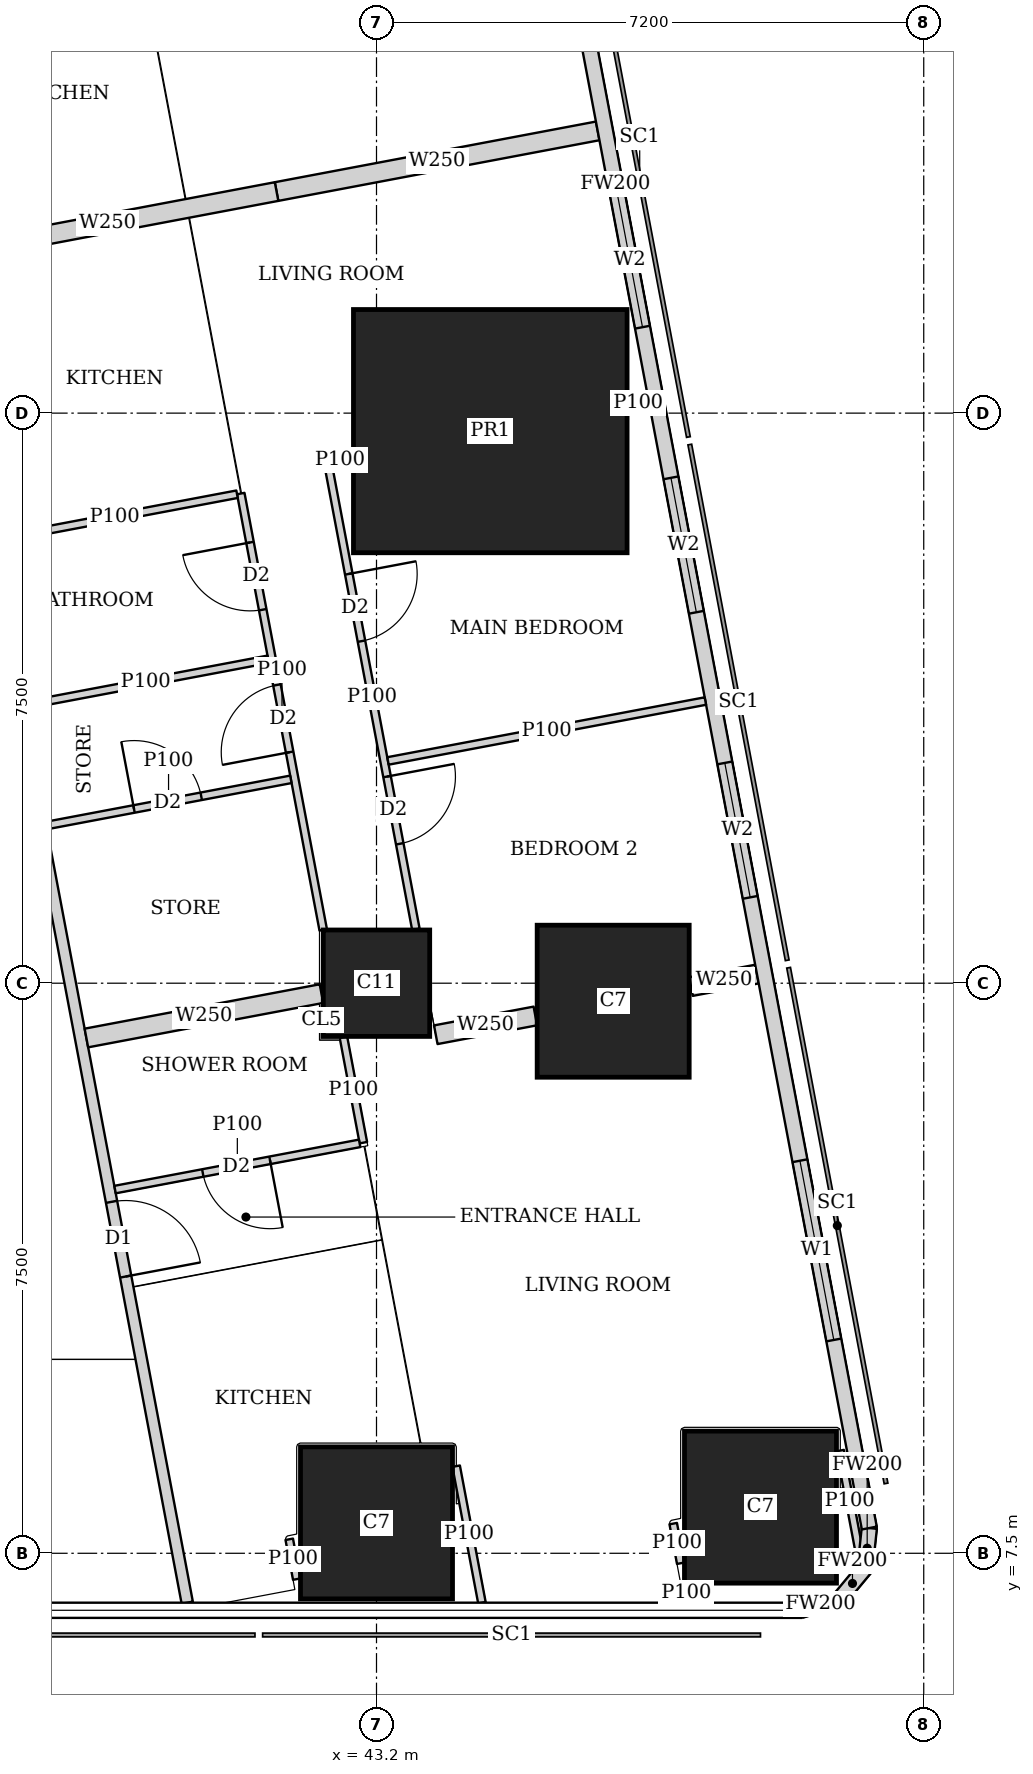
"""IFC4 building model, lengths in metres.
Left out: names, types, materials, properties, quantities, classifications, styles, units other than length and angle.
Written with IfcOpenShell. Run it as: python <this file> out.ifc"""

import sys

from ifc_helpers import new_model, si_unit, direction, frame, frame_2d, origin, origin_2d, place, context, subcontext, project, spatial, rectangle, extrude, element, fill, save


model = new_model("IFC4")
c1 = context("Model", 3, precision=1e-05, world=origin(), true_north=direction((0.0, 1.0)))
c2 = subcontext(c1, "Body", "Model", "MODEL_VIEW")
j1 = project(units=[si_unit("LENGTHUNIT", "METRE"), si_unit("PLANEANGLEUNIT", "RADIAN")], contexts=[c1])
p1 = place(None, origin())
s1 = spatial("IfcSite", under=j1, at=p1, CompositionType="ELEMENT")
p2 = place(p1, origin())
s2 = spatial("IfcBuilding", under=s1, at=p2, CompositionType="ELEMENT")
p3 = place(p2, frame((0.0, 0.0, 266.6)))
s3 = spatial("IfcBuildingStorey", under=s2, at=p3, CompositionType="ELEMENT", Elevation=266.6)
for number, where, z_axis, x_axis in (
    (1, (43.2, 7.9, 0.0), (0.0, 0.0, 1.0), (1.0, 0.0, 0.0)),
    (2, (48.252, 8.107, 0.0), (0.0, 0.0, 1.0), (1.0, 0.0, 0.0)),
):
    element("IfcColumn", number, at=place(p3, frame(where, z_axis=z_axis, x_axis=x_axis)), inside=s3, PredefinedType="COLUMN", context=c2, shape_type="SweptSolid", body=[
        extrude(rectangle(XDim=2.0, YDim=2.0, at=origin_2d()), origin(), (0.0, 0.0, 1.0), 3.75),
    ])
p4 = place(p3, frame((43.2, 15.0, 0.0), z_axis=(0.0, 0.0, 1.0), x_axis=(1.0, 0.0, 0.0)))
e3 = element("IfcColumn", 3, at=p4, inside=s3, PredefinedType="COLUMN", context=c2, shape_type="SweptSolid", body=[
    extrude(rectangle(XDim=1.4, YDim=1.4, at=origin_2d()), origin(), (0.0, 0.0, 1.0), 3.75),
])
p5 = place(p3, frame((46.314, 14.763, 0.0), z_axis=(0.0, 0.0, 1.0), x_axis=(1.0, 0.0, 0.0)))
e4 = element("IfcColumn", 4, at=p5, inside=s3, PredefinedType="COLUMN", context=c2, shape_type="SweptSolid", body=[
    extrude(rectangle(XDim=2.0, YDim=2.0, at=origin_2d()), origin(), (0.0, 0.0, 1.0), 3.75),
])
p6 = place(p3, frame((44.697, 22.263, 0.0), z_axis=(0.0, 0.0, 1.0), x_axis=(1.0, 0.0, 0.0)))
e5 = element("IfcColumn", 5, at=p6, inside=s3, PredefinedType="COLUMN", context=c2, shape_type="SweptSolid", body=[
    extrude(rectangle(XDim=3.6, YDim=3.2, at=origin_2d()), origin(), (0.0, 0.0, 1.0), 3.75),
])
p7 = place(p3, frame((48.787, 6.75, 0.0), z_axis=(0.0, 0.0, 1.0), x_axis=(0.957282247819, 0.289155145225, 0.0)))
e6 = element("IfcWall", 6, at=p7, inside=s3, PredefinedType="SOLIDWALL", context=c2, shape_type="SweptSolid", body=[
    extrude(rectangle(XDim=0.533, YDim=0.2, at=frame_2d((0.266, 0.0))), origin(), (0.0, 0.0, 1.0), 3.5),
])
p8 = place(p3, frame((49.297, 6.904, 0.0), z_axis=(0.0, 0.0, 1.0), x_axis=(0.639255849474, 0.768994121508, 0.0)))
e7 = element("IfcWall", 7, at=p8, inside=s3, PredefinedType="SOLIDWALL", context=c2, shape_type="SweptSolid", body=[
    extrude(rectangle(XDim=0.518, YDim=0.2, at=frame_2d((0.259, 0.0))), origin(), (0.0, 0.0, 1.0), 3.5),
])
p9 = place(p3, frame((49.628, 7.302, 0.0), z_axis=(0.0, 0.0, 1.0), x_axis=(0.105352390132, 0.994434952068, 0.0)))
e8 = element("IfcWall", 8, at=p9, inside=s3, PredefinedType="SOLIDWALL", context=c2, shape_type="SweptSolid", body=[
    extrude(rectangle(XDim=0.533, YDim=0.2, at=frame_2d((0.267, 0.0))), origin(), (0.0, 0.0, 1.0), 3.5),
])
p10 = place(p3, frame((49.684, 7.832, 0.0), z_axis=(0.0, 0.0, 1.0), x_axis=(-0.185616669694, 0.982622232565, 0.0)))
e9 = element("IfcWall", 9, at=p10, inside=s3, PredefinedType="SOLIDWALL", context=c2, shape_type="SweptSolid", body=[
    extrude(rectangle(XDim=36.0, YDim=0.2, at=frame_2d((18.0, 0.0))), origin(), (0.0, 0.0, 1.0), 3.5),
])
p11 = place(p10, frame((2.518, 0.0, 0.9)))
e10 = element("IfcOpeningElement", 10, at=p11, cuts=e9, PredefinedType="OPENING", context=c2, shape_type="SweptSolid", body=[
    extrude(rectangle(XDim=2.4, YDim=1.5, at=frame_2d((1.2, 0.75))), frame((0.0, 0.11, 0.0), z_axis=(0.0, -1.0, 0.0), x_axis=(1.0, 0.0, 0.0)), (0.0, 0.0, 1.0), 0.22),
])
p12 = place(p10, frame((8.444, 0.0, 0.9)))
e11 = element("IfcOpeningElement", 11, at=p12, cuts=e9, PredefinedType="OPENING", context=c2, shape_type="SweptSolid", body=[
    extrude(rectangle(XDim=1.8, YDim=1.5, at=frame_2d((0.9, 0.75))), frame((0.0, 0.11, 0.0), z_axis=(0.0, -1.0, 0.0), x_axis=(1.0, 0.0, 0.0)), (0.0, 0.0, 1.0), 0.22),
])
p13 = place(p10, frame((12.261, 0.0, 0.9)))
e12 = element("IfcOpeningElement", 12, at=p13, cuts=e9, PredefinedType="OPENING", context=c2, shape_type="SweptSolid", body=[
    extrude(rectangle(XDim=1.8, YDim=1.5, at=frame_2d((0.9, 0.75))), frame((0.0, 0.11, 0.0), z_axis=(0.0, -1.0, 0.0), x_axis=(1.0, 0.0, 0.0)), (0.0, 0.0, 1.0), 0.22),
])
p14 = place(p10, frame((16.078, 0.0, 0.9)))
e13 = element("IfcOpeningElement", 13, at=p14, cuts=e9, PredefinedType="OPENING", context=c2, shape_type="SweptSolid", body=[
    extrude(rectangle(XDim=1.8, YDim=1.5, at=frame_2d((0.9, 0.75))), frame((0.0, 0.11, 0.0), z_axis=(0.0, -1.0, 0.0), x_axis=(1.0, 0.0, 0.0)), (0.0, 0.0, 1.0), 0.22),
])
p15 = place(p10, frame((19.894, 0.0, 0.9)))
e14 = element("IfcOpeningElement", 14, at=p15, cuts=e9, PredefinedType="OPENING", context=c2, shape_type="SweptSolid", body=[
    extrude(rectangle(XDim=1.8, YDim=1.5, at=frame_2d((0.9, 0.75))), frame((0.0, 0.11, 0.0), z_axis=(0.0, -1.0, 0.0), x_axis=(1.0, 0.0, 0.0)), (0.0, 0.0, 1.0), 0.22),
])
p16 = place(p10, frame((23.71, 0.0, 0.9)))
e15 = element("IfcOpeningElement", 15, at=p16, cuts=e9, PredefinedType="OPENING", context=c2, shape_type="SweptSolid", body=[
    extrude(rectangle(XDim=1.8, YDim=1.5, at=frame_2d((0.9, 0.75))), frame((0.0, 0.11, 0.0), z_axis=(0.0, -1.0, 0.0), x_axis=(1.0, 0.0, 0.0)), (0.0, 0.0, 1.0), 0.22),
])
p17 = place(p10, frame((27.526, 0.0, 0.9)))
e16 = element("IfcOpeningElement", 16, at=p17, cuts=e9, PredefinedType="OPENING", context=c2, shape_type="SweptSolid", body=[
    extrude(rectangle(XDim=1.8, YDim=1.5, at=frame_2d((0.9, 0.75))), frame((0.0, 0.11, 0.0), z_axis=(0.0, -1.0, 0.0), x_axis=(1.0, 0.0, 0.0)), (0.0, 0.0, 1.0), 0.22),
])
p18 = place(p10, frame((32.046, 0.0, 0.9)))
e17 = element("IfcOpeningElement", 17, at=p18, cuts=e9, PredefinedType="OPENING", context=c2, shape_type="SweptSolid", body=[
    extrude(rectangle(XDim=1.8, YDim=1.5, at=frame_2d((0.9, 0.75))), frame((0.0, 0.11, 0.0), z_axis=(0.0, -1.0, 0.0), x_axis=(1.0, 0.0, 0.0)), (0.0, 0.0, 1.0), 0.22),
])
p19 = place(p3, frame((34.036, 42.186, 0.0), z_axis=(0.0, 0.0, 1.0), x_axis=(0.185593518645, -0.9826266055, 0.0)))
e18 = element("IfcWall", 18, at=p19, inside=s3, PredefinedType="SOLIDWALL", context=c2, shape_type="SweptSolid", body=[
    extrude(rectangle(XDim=35.961, YDim=0.15, at=frame_2d((17.98, 0.0))), origin(), (0.0, 0.0, 1.0), 2.5),
])
p20 = place(p19, frame((15.529, 0.0, 0.0)))
e19 = element("IfcOpeningElement", 19, at=p20, cuts=e18, PredefinedType="OPENING", context=c2, shape_type="SweptSolid", body=[
    extrude(rectangle(XDim=1.0, YDim=2.1, at=frame_2d((0.5, 1.05))), frame((0.0, 0.085, 0.0), z_axis=(0.0, -1.0, 0.0), x_axis=(1.0, 0.0, 0.0)), (0.0, 0.0, 1.0), 0.17),
])
p21 = place(p19, frame((19.345, 0.0, 0.0)))
e20 = element("IfcOpeningElement", 20, at=p21, cuts=e18, PredefinedType="OPENING", context=c2, shape_type="SweptSolid", body=[
    extrude(rectangle(XDim=1.0, YDim=2.1, at=frame_2d((0.5, 1.05))), frame((0.0, 0.085, 0.0), z_axis=(0.0, -1.0, 0.0), x_axis=(1.0, 0.0, 0.0)), (0.0, 0.0, 1.0), 0.17),
])
p22 = place(p19, frame((30.594, 0.0, 0.0)))
e21 = element("IfcOpeningElement", 21, at=p22, cuts=e18, PredefinedType="OPENING", context=c2, shape_type="SweptSolid", body=[
    extrude(rectangle(XDim=1.0, YDim=2.1, at=frame_2d((0.5, 1.05))), frame((0.0, 0.085, 0.0), z_axis=(0.0, -1.0, 0.0), x_axis=(1.0, 0.0, 0.0)), (0.0, 0.0, 1.0), 0.17),
])
p23 = place(p3, frame((44.248, 8.646, 0.0), z_axis=(0.0, 0.0, 1.0), x_axis=(0.185417594585, -0.982659816833, 0.0)))
e22 = element("IfcWall", 22, at=p23, inside=s3, PredefinedType="PARTITIONING", context=c2, shape_type="SweptSolid", body=[
    extrude(rectangle(XDim=1.828, YDim=0.1, at=frame_2d((0.914, 0.0))), origin(), (0.0, 0.0, 1.0), 2.05),
])
p24 = place(p3, frame((42.151, 7.16, 0.0), z_axis=(0.0, 0.0, 1.0), x_axis=(-0.185366164644, 0.982669519729, 0.0)))
e23 = element("IfcWall", 23, at=p24, inside=s3, PredefinedType="PARTITIONING", context=c2, shape_type="SweptSolid", body=[
    extrude(rectangle(XDim=0.533, YDim=0.1, at=frame_2d((0.267, 0.0))), origin(), (0.0, 0.0, 1.0), 2.5),
])
p25 = place(p3, frame((49.3, 8.851, 0.0), z_axis=(0.0, 0.0, 1.0), x_axis=(0.18581620423, -0.982584519645, 0.0)))
e24 = element("IfcWall", 24, at=p25, inside=s3, PredefinedType="PARTITIONING", context=c2, shape_type="SweptSolid", body=[
    extrude(rectangle(XDim=1.351, YDim=0.1, at=frame_2d((0.675, 0.0))), origin(), (0.0, 0.0, 1.0), 3.5),
])
p26 = place(p3, frame((47.301, 6.85, 0.0), z_axis=(0.0, 0.0, 1.0), x_axis=(-0.187513903188, 0.982261948826, 0.0)))
e25 = element("IfcWall", 25, at=p26, inside=s3, PredefinedType="PARTITIONING", context=c2, shape_type="SweptSolid", body=[
    extrude(rectangle(XDim=0.251, YDim=0.1, at=frame_2d((0.125, 0.0))), origin(), (0.0, 0.0, 1.0), 3.5),
])
p27 = place(p3, frame((47.203, 7.369, 0.0), z_axis=(0.0, 0.0, 1.0), x_axis=(-0.186456243114, 0.982463266185, 0.0)))
e26 = element("IfcWall", 26, at=p27, inside=s3, PredefinedType="PARTITIONING", context=c2, shape_type="SweptSolid", body=[
    extrude(rectangle(XDim=0.53, YDim=0.1, at=frame_2d((0.265, 0.0))), origin(), (0.0, 0.0, 1.0), 2.05),
])
p28 = place(p3, frame((42.566, 21.809, 0.0), z_axis=(0.0, 0.0, 1.0), x_axis=(0.185613526435, -0.98262282632, 0.0)))
e27 = element("IfcWall", 27, at=p28, inside=s3, PredefinedType="PARTITIONING", context=c2, shape_type="SweptSolid", body=[
    extrude(rectangle(XDim=6.207, YDim=0.1, at=frame_2d((3.104, 0.0))), origin(), (0.0, 0.0, 1.0), 2.5),
])
p29 = place(p28, frame((1.45, 0.0, 0.0)))
e28 = element("IfcOpeningElement", 28, at=p29, cuts=e27, PredefinedType="OPENING", context=c2, shape_type="SweptSolid", body=[
    extrude(rectangle(XDim=0.9, YDim=2.1, at=frame_2d((0.45, 1.05))), frame((0.0, 0.06, 0.0), z_axis=(0.0, -1.0, 0.0), x_axis=(1.0, 0.0, 0.0)), (0.0, 0.0, 1.0), 0.12),
])
p30 = place(p28, frame((4.163, 0.0, 0.0)))
e29 = element("IfcOpeningElement", 29, at=p30, cuts=e27, PredefinedType="OPENING", context=c2, shape_type="SweptSolid", body=[
    extrude(rectangle(XDim=0.9, YDim=2.1, at=frame_2d((0.45, 1.05))), frame((0.0, 0.06, 0.0), z_axis=(0.0, -1.0, 0.0), x_axis=(1.0, 0.0, 0.0)), (0.0, 0.0, 1.0), 0.12),
])
p31 = place(p3, frame((41.414, 21.442, 0.0), z_axis=(0.0, 0.0, 1.0), x_axis=(0.185698675093, -0.982606738257, 0.0)))
e30 = element("IfcWall", 30, at=p31, inside=s3, PredefinedType="PARTITIONING", context=c2, shape_type="SweptSolid", body=[
    extrude(rectangle(XDim=5.843, YDim=0.1, at=frame_2d((2.921, 0.0))), origin(), (0.0, 0.0, 1.0), 3.5),
])
p32 = place(p31, frame((0.655, 0.0, 0.0)))
e31 = element("IfcOpeningElement", 31, at=p32, cuts=e30, PredefinedType="OPENING", context=c2, shape_type="SweptSolid", body=[
    extrude(rectangle(XDim=0.9, YDim=2.1, at=frame_2d((0.45, 1.05))), frame((0.0, 0.06, 0.0), z_axis=(0.0, -1.0, 0.0), x_axis=(1.0, 0.0, 0.0)), (0.0, 0.0, 1.0), 0.12),
])
p33 = place(p31, frame((2.563, 0.0, 0.0)))
e32 = element("IfcOpeningElement", 32, at=p33, cuts=e30, PredefinedType="OPENING", context=c2, shape_type="SweptSolid", body=[
    extrude(rectangle(XDim=0.9, YDim=2.1, at=frame_2d((0.45, 1.05))), frame((0.0, 0.06, 0.0), z_axis=(0.0, -1.0, 0.0), x_axis=(1.0, 0.0, 0.0)), (0.0, 0.0, 1.0), 0.12),
])
p34 = place(p3, frame((46.782, 22.657, 0.0), z_axis=(0.0, 0.0, 1.0), x_axis=(-0.982574553168, -0.185868898601, 0.0)))
e33 = element("IfcWall", 33, at=p34, inside=s3, PredefinedType="PARTITIONING", context=c2, shape_type="SweptSolid", body=[
    extrude(rectangle(XDim=0.28, YDim=0.1, at=frame_2d((0.14, 0.0))), origin(), (0.0, 0.0, 1.0), 3.5),
])
p35 = place(p3, frame((42.887, 21.921, 0.0), z_axis=(0.0, 0.0, 1.0), x_axis=(-0.982274918032, -0.187445953293, 0.0)))
e34 = element("IfcWall", 34, at=p35, inside=s3, PredefinedType="PARTITIONING", context=c2, shape_type="SweptSolid", body=[
    extrude(rectangle(XDim=0.336, YDim=0.1, at=frame_2d((0.168, 0.0))), origin(), (0.0, 0.0, 1.0), 2.5),
])
p36 = place(p3, frame((47.527, 18.712, 0.0), z_axis=(0.0, 0.0, 1.0), x_axis=(-0.982665405803, -0.185387972203, 0.0)))
e35 = element("IfcWall", 35, at=p36, inside=s3, PredefinedType="PARTITIONING", context=c2, shape_type="SweptSolid", body=[
    extrude(rectangle(XDim=4.25, YDim=0.1, at=frame_2d((2.125, 0.0))), origin(), (0.0, 0.0, 1.0), 2.5),
])
p37 = place(p3, frame((41.365, 21.433, 0.0), z_axis=(0.0, 0.0, 1.0), x_axis=(-0.982607026909, -0.185697147715, 0.0)))
e36 = element("IfcWall", 36, at=p37, inside=s3, PredefinedType="PARTITIONING", context=c2, shape_type="SweptSolid", body=[
    extrude(rectangle(XDim=3.275, YDim=0.1, at=frame_2d((1.637, 0.0))), origin(), (0.0, 0.0, 1.0), 3.5),
])
p38 = place(p3, frame((42.073, 17.682, 0.0), z_axis=(0.0, 0.0, 1.0), x_axis=(-0.982620626894, -0.185625169636, 0.0)))
e37 = element("IfcWall", 37, at=p38, inside=s3, PredefinedType="PARTITIONING", context=c2, shape_type="SweptSolid", body=[
    extrude(rectangle(XDim=3.275, YDim=0.1, at=frame_2d((1.637, 0.0))), origin(), (0.0, 0.0, 1.0), 3.5),
])
p39 = place(p38, frame((1.2, 0.0, 0.0)))
e38 = element("IfcOpeningElement", 38, at=p39, cuts=e37, PredefinedType="OPENING", context=c2, shape_type="SweptSolid", body=[
    extrude(rectangle(XDim=0.9, YDim=2.1, at=frame_2d((0.45, 1.05))), frame((0.0, 0.06, 0.0), z_axis=(0.0, -1.0, 0.0), x_axis=(1.0, 0.0, 0.0)), (0.0, 0.0, 1.0), 0.12),
])
p40 = place(p3, frame((41.775, 19.261, 0.0), z_axis=(0.0, 0.0, 1.0), x_axis=(-0.982620626894, -0.185625169636, 0.0)))
e39 = element("IfcWall", 39, at=p40, inside=s3, PredefinedType="PARTITIONING", context=c2, shape_type="SweptSolid", body=[
    extrude(rectangle(XDim=3.275, YDim=0.1, at=frame_2d((1.637, 0.0))), origin(), (0.0, 0.0, 1.0), 3.5),
])
p41 = place(p3, frame((46.11, 26.213, 0.0), z_axis=(0.0, 0.0, 1.0), x_axis=(-0.982633535512, -0.185556823879, 0.0)))
e40 = element("IfcWall", 40, at=p41, inside=s3, PredefinedType="SOLIDWALL", context=c2, shape_type="SweptSolid", body=[
    extrude(rectangle(XDim=4.3, YDim=0.25, at=frame_2d((2.15, 0.0))), origin(), (0.0, 0.0, 1.0), 2.5),
])
p42 = place(p3, frame((41.885, 25.415, 0.0), z_axis=(0.0, 0.0, 1.0), x_axis=(-0.982612837616, -0.185666398014, 0.0)))
e41 = element("IfcWall", 41, at=p42, inside=s3, PredefinedType="SOLIDWALL", context=c2, shape_type="SweptSolid", body=[
    extrude(rectangle(XDim=4.525, YDim=0.25, at=frame_2d((2.262, 0.0))), origin(), (0.0, 0.0, 1.0), 3.5),
])
p43 = place(p3, frame((42.765, 14.29, 0.0), z_axis=(0.0, 0.0, 1.0), x_axis=(0.185634589628, -0.982618847333, 0.0)))
e42 = element("IfcWall", 42, at=p43, inside=s3, PredefinedType="PARTITIONING", context=c2, shape_type="SweptSolid", body=[
    extrude(rectangle(XDim=1.413, YDim=0.1, at=frame_2d((0.706, 0.0))), origin(), (0.0, 0.0, 1.0), 3.5),
])
p44 = place(p3, frame((42.978, 12.893, 0.0), z_axis=(0.0, 0.0, 1.0), x_axis=(-0.982607026909, -0.185697147715, 0.0)))
e43 = element("IfcWall", 43, at=p44, inside=s3, PredefinedType="PARTITIONING", context=c2, shape_type="SweptSolid", body=[
    extrude(rectangle(XDim=3.275, YDim=0.1, at=frame_2d((1.637, 0.0))), origin(), (0.0, 0.0, 1.0), 3.5),
])
p45 = place(p44, frame((1.2, 0.0, 0.0)))
e44 = element("IfcOpeningElement", 44, at=p45, cuts=e43, PredefinedType="OPENING", context=c2, shape_type="SweptSolid", body=[
    extrude(rectangle(XDim=0.9, YDim=2.1, at=frame_2d((0.45, 1.05))), frame((0.0, 0.06, 0.0), z_axis=(0.0, -1.0, 0.0), x_axis=(1.0, 0.0, 0.0)), (0.0, 0.0, 1.0), 0.12),
])
p46 = place(p3, frame((48.206, 15.12, 0.0), z_axis=(0.0, 0.0, 1.0), x_axis=(-0.982608419258, -0.185689780017, 0.0)))
e45 = element("IfcWall", 45, at=p46, inside=s3, PredefinedType="SOLIDWALL", context=c2, shape_type="SweptSolid", body=[
    extrude(rectangle(XDim=0.884, YDim=0.25, at=frame_2d((0.442, 0.0))), origin(), (0.0, 0.0, 1.0), 3.5),
])
p47 = place(p3, frame((45.29, 14.569, 0.0), z_axis=(0.0, 0.0, 1.0), x_axis=(-0.982676759201, -0.185327782391, 0.0)))
e46 = element("IfcWall", 46, at=p47, inside=s3, PredefinedType="SOLIDWALL", context=c2, shape_type="SweptSolid", body=[
    extrude(rectangle(XDim=1.333, YDim=0.25, at=frame_2d((0.667, 0.0))), origin(), (0.0, 0.0, 1.0), 3.5),
])
p48 = place(p3, frame((42.476, 14.863, 0.0), z_axis=(0.0, 0.0, 1.0), x_axis=(-0.982638716117, -0.185529387398, 0.0)))
e47 = element("IfcWall", 47, at=p48, inside=s3, PredefinedType="SOLIDWALL", context=c2, shape_type="SweptSolid", body=[
    extrude(rectangle(XDim=3.148, YDim=0.25, at=frame_2d((1.574, 0.0))), origin(), (0.0, 0.0, 1.0), 3.5),
])
p49 = place(p11, origin())
e48 = element("IfcWindow", 48, at=p49, inside=s3, PartitioningType="SINGLE_PANEL", PredefinedType="WINDOW", context=c2, shape_type="SweptSolid", body=[
    extrude(rectangle(XDim=2.4, YDim=1.5, at=frame_2d((1.2, 0.75))), frame((0.0, 0.03, 0.0), z_axis=(0.0, -1.0, 0.0), x_axis=(1.0, 0.0, 0.0)), (0.0, 0.0, 1.0), 0.06),
])
fill(e10, e48)
p50 = place(p12, origin())
e49 = element("IfcWindow", 49, at=p50, inside=s3, PartitioningType="SINGLE_PANEL", PredefinedType="WINDOW", context=c2, shape_type="SweptSolid", body=[
    extrude(rectangle(XDim=1.8, YDim=1.5, at=frame_2d((0.9, 0.75))), frame((0.0, 0.03, 0.0), z_axis=(0.0, -1.0, 0.0), x_axis=(1.0, 0.0, 0.0)), (0.0, 0.0, 1.0), 0.06),
])
fill(e11, e49)
p51 = place(p13, origin())
e50 = element("IfcWindow", 50, at=p51, inside=s3, PartitioningType="SINGLE_PANEL", PredefinedType="WINDOW", context=c2, shape_type="SweptSolid", body=[
    extrude(rectangle(XDim=1.8, YDim=1.5, at=frame_2d((0.9, 0.75))), frame((0.0, 0.03, 0.0), z_axis=(0.0, -1.0, 0.0), x_axis=(1.0, 0.0, 0.0)), (0.0, 0.0, 1.0), 0.06),
])
fill(e12, e50)
p52 = place(p14, origin())
e51 = element("IfcWindow", 51, at=p52, inside=s3, PartitioningType="SINGLE_PANEL", PredefinedType="WINDOW", context=c2, shape_type="SweptSolid", body=[
    extrude(rectangle(XDim=1.8, YDim=1.5, at=frame_2d((0.9, 0.75))), frame((0.0, 0.03, 0.0), z_axis=(0.0, -1.0, 0.0), x_axis=(1.0, 0.0, 0.0)), (0.0, 0.0, 1.0), 0.06),
])
fill(e13, e51)
p53 = place(p29, origin())
e52 = element("IfcDoor", 52, at=p53, inside=s3, OperationType="SINGLE_SWING_LEFT", PredefinedType="DOOR", context=c2, shape_type="SweptSolid", body=[
    extrude(rectangle(XDim=0.9, YDim=2.1, at=frame_2d((0.45, 1.05))), frame((0.0, 0.025, 0.0), z_axis=(0.0, -1.0, 0.0), x_axis=(1.0, 0.0, 0.0)), (0.0, 0.0, 1.0), 0.05),
])
fill(e28, e52)
p54 = place(p30, origin())
e53 = element("IfcDoor", 53, at=p54, inside=s3, OperationType="SINGLE_SWING_LEFT", PredefinedType="DOOR", context=c2, shape_type="SweptSolid", body=[
    extrude(rectangle(XDim=0.9, YDim=2.1, at=frame_2d((0.45, 1.05))), frame((0.0, 0.025, 0.0), z_axis=(0.0, -1.0, 0.0), x_axis=(1.0, 0.0, 0.0)), (0.0, 0.0, 1.0), 0.05),
])
fill(e29, e53)
p55 = place(p32, origin())
e54 = element("IfcDoor", 54, at=p55, inside=s3, OperationType="SINGLE_SWING_RIGHT", PredefinedType="DOOR", context=c2, shape_type="SweptSolid", body=[
    extrude(rectangle(XDim=0.9, YDim=2.1, at=frame_2d((0.45, 1.05))), frame((0.0, 0.025, 0.0), z_axis=(0.0, -1.0, 0.0), x_axis=(1.0, 0.0, 0.0)), (0.0, 0.0, 1.0), 0.05),
])
fill(e31, e54)
p56 = place(p33, origin())
e55 = element("IfcDoor", 55, at=p56, inside=s3, OperationType="SINGLE_SWING_LEFT", PredefinedType="DOOR", context=c2, shape_type="SweptSolid", body=[
    extrude(rectangle(XDim=0.9, YDim=2.1, at=frame_2d((0.45, 1.05))), frame((0.0, 0.025, 0.0), z_axis=(0.0, -1.0, 0.0), x_axis=(1.0, 0.0, 0.0)), (0.0, 0.0, 1.0), 0.05),
])
fill(e32, e55)
p57 = place(p45, origin())
e56 = element("IfcDoor", 56, at=p57, inside=s3, OperationType="SINGLE_SWING_LEFT", PredefinedType="DOOR", context=c2, shape_type="SweptSolid", body=[
    extrude(rectangle(XDim=0.9, YDim=2.1, at=frame_2d((0.45, 1.05))), frame((0.0, 0.025, 0.0), z_axis=(0.0, -1.0, 0.0), x_axis=(1.0, 0.0, 0.0)), (0.0, 0.0, 1.0), 0.05),
])
fill(e44, e56)
p58 = place(p22, origin())
e57 = element("IfcDoor", 57, at=p58, inside=s3, OperationType="SINGLE_SWING_RIGHT", PredefinedType="DOOR", context=c2, shape_type="SweptSolid", body=[
    extrude(rectangle(XDim=1.0, YDim=2.1, at=frame_2d((0.5, 1.05))), frame((0.0, 0.025, 0.0), z_axis=(0.0, -1.0, 0.0), x_axis=(1.0, 0.0, 0.0)), (0.0, 0.0, 1.0), 0.05),
])
fill(e21, e57)
p59 = place(p39, origin())
e58 = element("IfcDoor", 58, at=p59, inside=s3, OperationType="SINGLE_SWING_LEFT", PredefinedType="DOOR", context=c2, shape_type="SweptSolid", body=[
    extrude(rectangle(XDim=0.9, YDim=2.1, at=frame_2d((0.45, 1.05))), frame((0.0, 0.025, 0.0), z_axis=(0.0, -1.0, 0.0), x_axis=(1.0, 0.0, 0.0)), (0.0, 0.0, 1.0), 0.05),
])
fill(e38, e58)
save(model, sys.argv[1])
